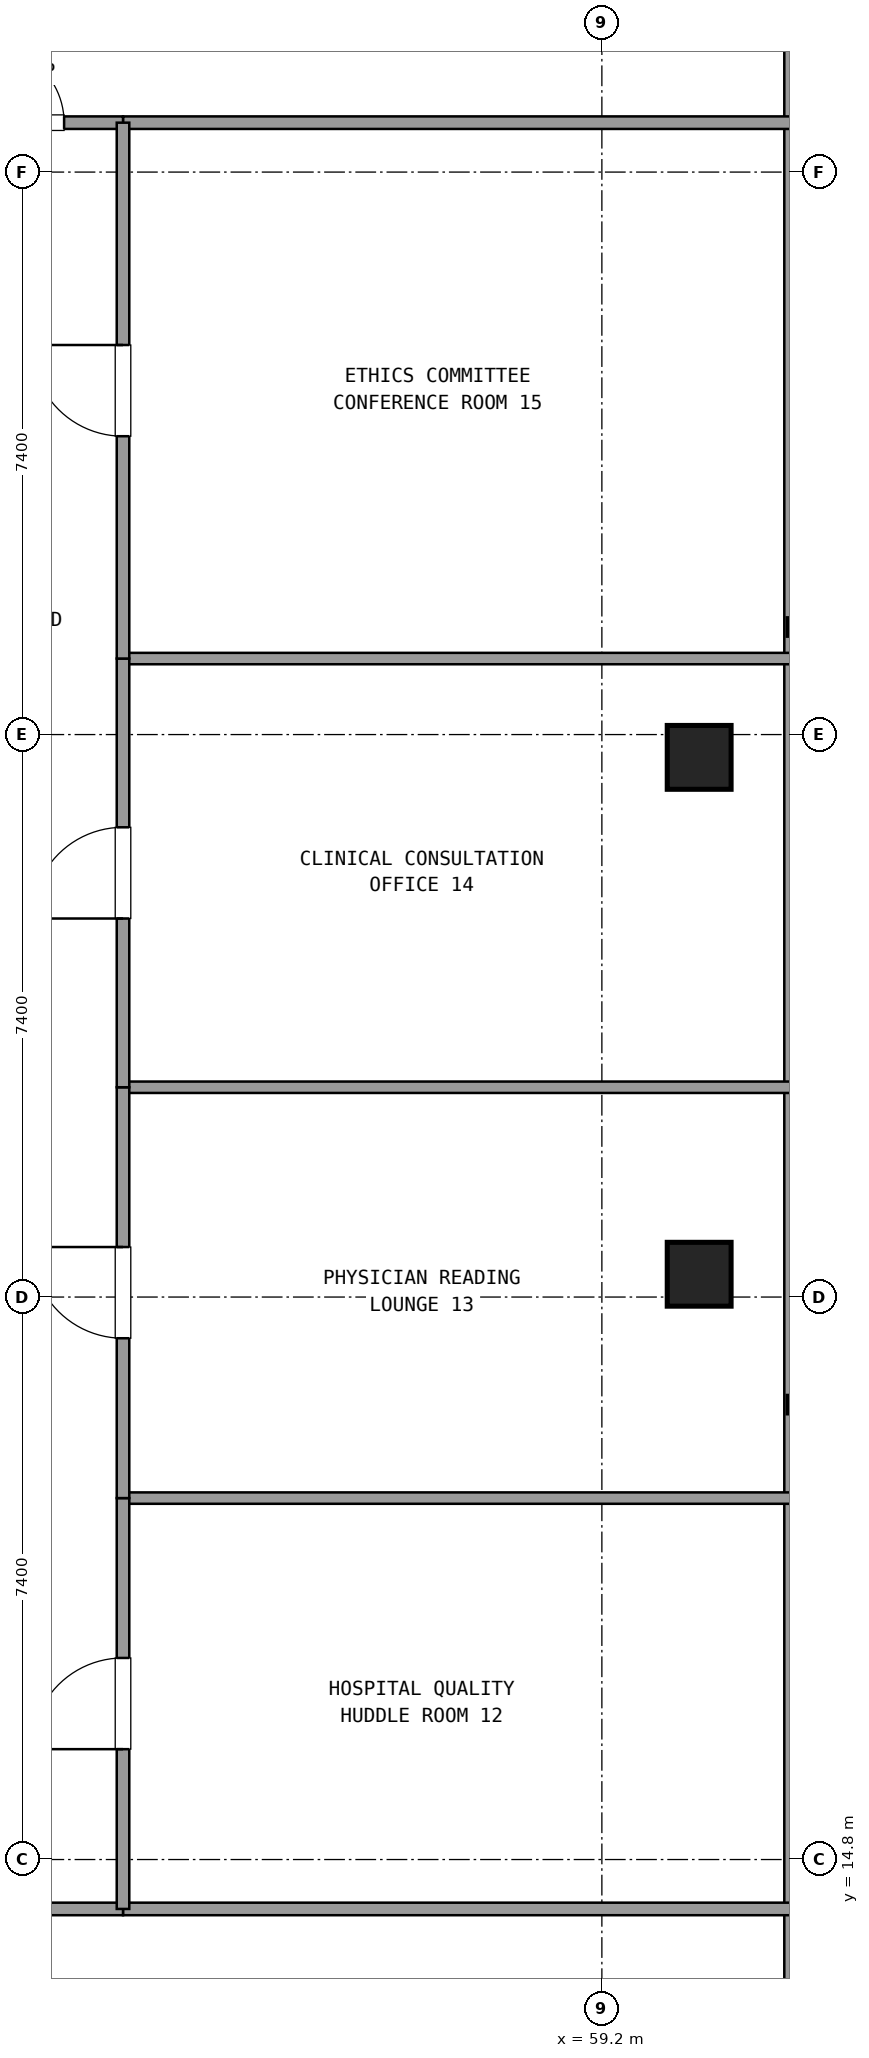
"""IFC4 building model, lengths in metres.
Left out: names, types, materials, properties, quantities, classifications, styles, units other than length and angle.
Written with IfcOpenShell. Run it as: python <this file> out.ifc"""

import sys

from ifc_helpers import new_model, si_unit, direction, frame, frame_2d, origin, origin_2d, place, context, subcontext, project, spatial, rectangle, extrude, element, fill, save


model = new_model("IFC4")
c1 = context("Model", 3, precision=1e-05, world=origin(), true_north=direction((0.0, 1.0)))
c2 = subcontext(c1, "Body", "Model", "MODEL_VIEW")
j1 = project(units=[si_unit("LENGTHUNIT", "METRE"), si_unit("PLANEANGLEUNIT", "RADIAN")], contexts=[c1])
p1 = place(None, origin())
s1 = spatial("IfcSite", under=j1, at=p1, CompositionType="ELEMENT")
p2 = place(p1, origin())
s2 = spatial("IfcBuilding", under=s1, at=p2, CompositionType="ELEMENT")
p3 = place(p2, frame((0.0, 0.0, 278.82)))
s3 = spatial("IfcBuildingStorey", under=s2, at=p3, CompositionType="ELEMENT", Elevation=278.82)
for number, where, z_axis, x_axis in (
    (1, (60.48, 22.5, 0.0), (0.0, 0.0, 1.0), (1.0, 0.0, 0.0)),
    (2, (60.48, 29.3, 0.0), (0.0, 0.0, 1.0), (1.0, 0.0, 0.0)),
):
    element("IfcColumn", number, at=place(p3, frame(where, z_axis=z_axis, x_axis=x_axis)), inside=s3, PredefinedType="COLUMN", context=c2, shape_type="SweptSolid", body=[
        extrude(rectangle(XDim=0.84, YDim=0.84, at=origin_2d()), origin(), (0.0, 0.0, 1.0), 3.6),
    ])
p4 = place(p3, frame((61.72, 10.555, 0.0), z_axis=(0.0, 0.0, 1.0), x_axis=(0.0, 1.0, 0.0)))
e3 = element("IfcWall", 3, at=p4, inside=s3, PredefinedType="SOLIDWALL", context=c2, shape_type="SweptSolid", body=[
    extrude(rectangle(XDim=30.69, YDim=0.24, at=frame_2d((15.345, 0.0))), origin(), (0.0, 0.0, 1.0), 0.85),
])
for number, where, z_axis, x_axis in (
    (4, (52.9, 37.65, 0.0), (0.0, 0.0, 1.0), (1.0, 0.0, 0.0)),
    (5, (52.9, 14.15, 0.0), (0.0, 0.0, 1.0), (1.0, 0.0, 0.0)),
):
    element("IfcWall", number, at=place(p3, frame(where, z_axis=z_axis, x_axis=x_axis)), inside=s3, PredefinedType="PARTITIONING", context=c2, shape_type="SweptSolid", body=[
        extrude(rectangle(XDim=8.8, YDim=0.165, at=frame_2d((4.4, 0.0))), origin(), (0.0, 0.0, 1.0), 2.61),
    ])
p5 = place(p3, frame((50.35, 37.65, 0.0), z_axis=(0.0, 0.0, 1.0), x_axis=(1.0, 0.0, 0.0)))
e6 = element("IfcWall", 6, at=p5, inside=s3, PredefinedType="PARTITIONING", context=c2, shape_type="SweptSolid", body=[
    extrude(rectangle(XDim=2.55, YDim=0.165, at=frame_2d((1.275, 0.0))), origin(), (0.0, 0.0, 1.0), 2.61),
])
p6 = place(p5, frame((0.775, 0.0, 0.0)))
e7 = element("IfcOpeningElement", 7, at=p6, cuts=e6, PredefinedType="OPENING", context=c2, shape_type="SweptSolid", body=[
    extrude(rectangle(XDim=1.0, YDim=2.15, at=frame_2d((0.5, 1.075))), frame((0.0, 0.093, 0.0), z_axis=(0.0, -1.0, 0.0), x_axis=(1.0, 0.0, 0.0)), (0.0, 0.0, 1.0), 0.185),
])
p7 = place(p3, frame((48.84, 14.15, 0.0), z_axis=(0.0, 0.0, 1.0), x_axis=(1.0, 0.0, 0.0)))
e8 = element("IfcWall", 8, at=p7, inside=s3, PredefinedType="PARTITIONING", context=c2, shape_type="SweptSolid", body=[
    extrude(rectangle(XDim=4.06, YDim=0.165, at=frame_2d((2.03, 0.0))), origin(), (0.0, 0.0, 1.0), 2.61),
])
p8 = place(p7, frame((1.43, 0.0, 0.0)))
e9 = element("IfcOpeningElement", 9, at=p8, cuts=e8, PredefinedType="OPENING", context=c2, shape_type="SweptSolid", body=[
    extrude(rectangle(XDim=1.2, YDim=2.15, at=frame_2d((0.6, 1.075))), frame((0.0, 0.093, 0.0), z_axis=(0.0, -1.0, 0.0), x_axis=(1.0, 0.0, 0.0)), (0.0, 0.0, 1.0), 0.185),
])
p9 = place(p3, frame((52.9, 19.555, 0.0), z_axis=(0.0, 0.0, 1.0), x_axis=(1.0, 0.0, 0.0)))
e10 = element("IfcWall", 10, at=p9, inside=s3, PredefinedType="PARTITIONING", context=c2, shape_type="SweptSolid", body=[
    extrude(rectangle(XDim=8.8, YDim=0.15, at=frame_2d((4.4, 0.0))), origin(), (0.0, 0.0, 1.0), 2.61),
])
p10 = place(p3, frame((52.9, 14.15, 0.0), z_axis=(0.0, 0.0, 1.0), x_axis=(0.0, 1.0, 0.0)))
e11 = element("IfcWall", 11, at=p10, inside=s3, PredefinedType="PARTITIONING", context=c2, shape_type="SweptSolid", body=[
    extrude(rectangle(XDim=5.405, YDim=0.165, at=frame_2d((2.703, 0.0))), origin(), (0.0, 0.0, 1.0), 2.61),
])
p11 = place(p10, frame((2.102, 0.0, 0.0)))
e12 = element("IfcOpeningElement", 12, at=p11, cuts=e11, PredefinedType="OPENING", context=c2, shape_type="SweptSolid", body=[
    extrude(rectangle(XDim=1.2, YDim=2.15, at=frame_2d((0.6, 1.075))), frame((0.0, 0.093, 0.0), z_axis=(0.0, -1.0, 0.0), x_axis=(1.0, 0.0, 0.0)), (0.0, 0.0, 1.0), 0.185),
])
p12 = place(p3, frame((52.9, 24.96, 0.0), z_axis=(0.0, 0.0, 1.0), x_axis=(1.0, 0.0, 0.0)))
e13 = element("IfcWall", 13, at=p12, inside=s3, PredefinedType="PARTITIONING", context=c2, shape_type="SweptSolid", body=[
    extrude(rectangle(XDim=8.8, YDim=0.15, at=frame_2d((4.4, 0.0))), origin(), (0.0, 0.0, 1.0), 2.61),
])
p13 = place(p3, frame((52.9, 19.555, 0.0), z_axis=(0.0, 0.0, 1.0), x_axis=(0.0, 1.0, 0.0)))
e14 = element("IfcWall", 14, at=p13, inside=s3, PredefinedType="PARTITIONING", context=c2, shape_type="SweptSolid", body=[
    extrude(rectangle(XDim=5.405, YDim=0.165, at=frame_2d((2.703, 0.0))), origin(), (0.0, 0.0, 1.0), 2.61),
])
p14 = place(p13, frame((2.103, 0.0, 0.0)))
e15 = element("IfcOpeningElement", 15, at=p14, cuts=e14, PredefinedType="OPENING", context=c2, shape_type="SweptSolid", body=[
    extrude(rectangle(XDim=1.2, YDim=2.15, at=frame_2d((0.6, 1.075))), frame((0.0, 0.093, 0.0), z_axis=(0.0, -1.0, 0.0), x_axis=(1.0, 0.0, 0.0)), (0.0, 0.0, 1.0), 0.185),
])
p15 = place(p3, frame((52.9, 30.6, 0.0), z_axis=(0.0, 0.0, 1.0), x_axis=(1.0, 0.0, 0.0)))
e16 = element("IfcWall", 16, at=p15, inside=s3, PredefinedType="PARTITIONING", context=c2, shape_type="SweptSolid", body=[
    extrude(rectangle(XDim=8.8, YDim=0.15, at=frame_2d((4.4, 0.0))), origin(), (0.0, 0.0, 1.0), 2.61),
])
p16 = place(p3, frame((52.9, 24.96, 0.0), z_axis=(0.0, 0.0, 1.0), x_axis=(0.0, 1.0, 0.0)))
e17 = element("IfcWall", 17, at=p16, inside=s3, PredefinedType="PARTITIONING", context=c2, shape_type="SweptSolid", body=[
    extrude(rectangle(XDim=5.64, YDim=0.165, at=frame_2d((2.82, 0.0))), origin(), (0.0, 0.0, 1.0), 2.61),
])
p17 = place(p16, frame((2.22, 0.0, 0.0)))
e18 = element("IfcOpeningElement", 18, at=p17, cuts=e17, PredefinedType="OPENING", context=c2, shape_type="SweptSolid", body=[
    extrude(rectangle(XDim=1.2, YDim=2.15, at=frame_2d((0.6, 1.075))), frame((0.0, 0.093, 0.0), z_axis=(0.0, -1.0, 0.0), x_axis=(1.0, 0.0, 0.0)), (0.0, 0.0, 1.0), 0.185),
])
p18 = place(p3, frame((52.9, 30.6, 0.0), z_axis=(0.0, 0.0, 1.0), x_axis=(0.0, 1.0, 0.0)))
e19 = element("IfcWall", 19, at=p18, inside=s3, PredefinedType="PARTITIONING", context=c2, shape_type="SweptSolid", body=[
    extrude(rectangle(XDim=7.05, YDim=0.165, at=frame_2d((3.525, 0.0))), origin(), (0.0, 0.0, 1.0), 2.61),
])
p19 = place(p18, frame((2.925, 0.0, 0.0)))
e20 = element("IfcOpeningElement", 20, at=p19, cuts=e19, PredefinedType="OPENING", context=c2, shape_type="SweptSolid", body=[
    extrude(rectangle(XDim=1.2, YDim=2.15, at=frame_2d((0.6, 1.075))), frame((0.0, 0.093, 0.0), z_axis=(0.0, -1.0, 0.0), x_axis=(1.0, 0.0, 0.0)), (0.0, 0.0, 1.0), 0.185),
])
p20 = place(p6, origin())
e21 = element("IfcDoor", 21, at=p20, inside=s3, OperationType="SINGLE_SWING_LEFT", PredefinedType="DOOR", context=c2, shape_type="SweptSolid", body=[
    extrude(rectangle(XDim=1.0, YDim=2.15, at=frame_2d((0.5, 1.075))), frame((0.0, 0.025, 0.0), z_axis=(0.0, -1.0, 0.0), x_axis=(1.0, 0.0, 0.0)), (0.0, 0.0, 1.0), 0.05),
])
fill(e7, e21)
p21 = place(p11, origin())
e22 = element("IfcDoor", 22, at=p21, inside=s3, OperationType="SINGLE_SWING_LEFT", PredefinedType="DOOR", context=c2, shape_type="SweptSolid", body=[
    extrude(rectangle(XDim=1.2, YDim=2.15, at=frame_2d((0.6, 1.075))), frame((0.0, 0.025, 0.0), z_axis=(0.0, -1.0, 0.0), x_axis=(1.0, 0.0, 0.0)), (0.0, 0.0, 1.0), 0.05),
])
fill(e12, e22)
p22 = place(p14, origin())
e23 = element("IfcDoor", 23, at=p22, inside=s3, OperationType="SINGLE_SWING_RIGHT", PredefinedType="DOOR", context=c2, shape_type="SweptSolid", body=[
    extrude(rectangle(XDim=1.2, YDim=2.15, at=frame_2d((0.6, 1.075))), frame((0.0, 0.025, 0.0), z_axis=(0.0, -1.0, 0.0), x_axis=(1.0, 0.0, 0.0)), (0.0, 0.0, 1.0), 0.05),
])
fill(e15, e23)
p23 = place(p17, origin())
e24 = element("IfcDoor", 24, at=p23, inside=s3, OperationType="SINGLE_SWING_LEFT", PredefinedType="DOOR", context=c2, shape_type="SweptSolid", body=[
    extrude(rectangle(XDim=1.2, YDim=2.15, at=frame_2d((0.6, 1.075))), frame((0.0, 0.025, 0.0), z_axis=(0.0, -1.0, 0.0), x_axis=(1.0, 0.0, 0.0)), (0.0, 0.0, 1.0), 0.05),
])
fill(e18, e24)
p24 = place(p19, origin())
e25 = element("IfcDoor", 25, at=p24, inside=s3, OperationType="SINGLE_SWING_RIGHT", PredefinedType="DOOR", context=c2, shape_type="SweptSolid", body=[
    extrude(rectangle(XDim=1.2, YDim=2.15, at=frame_2d((0.6, 1.075))), frame((0.0, 0.025, 0.0), z_axis=(0.0, -1.0, 0.0), x_axis=(1.0, 0.0, 0.0)), (0.0, 0.0, 1.0), 0.05),
])
fill(e20, e25)
save(model, sys.argv[1])
